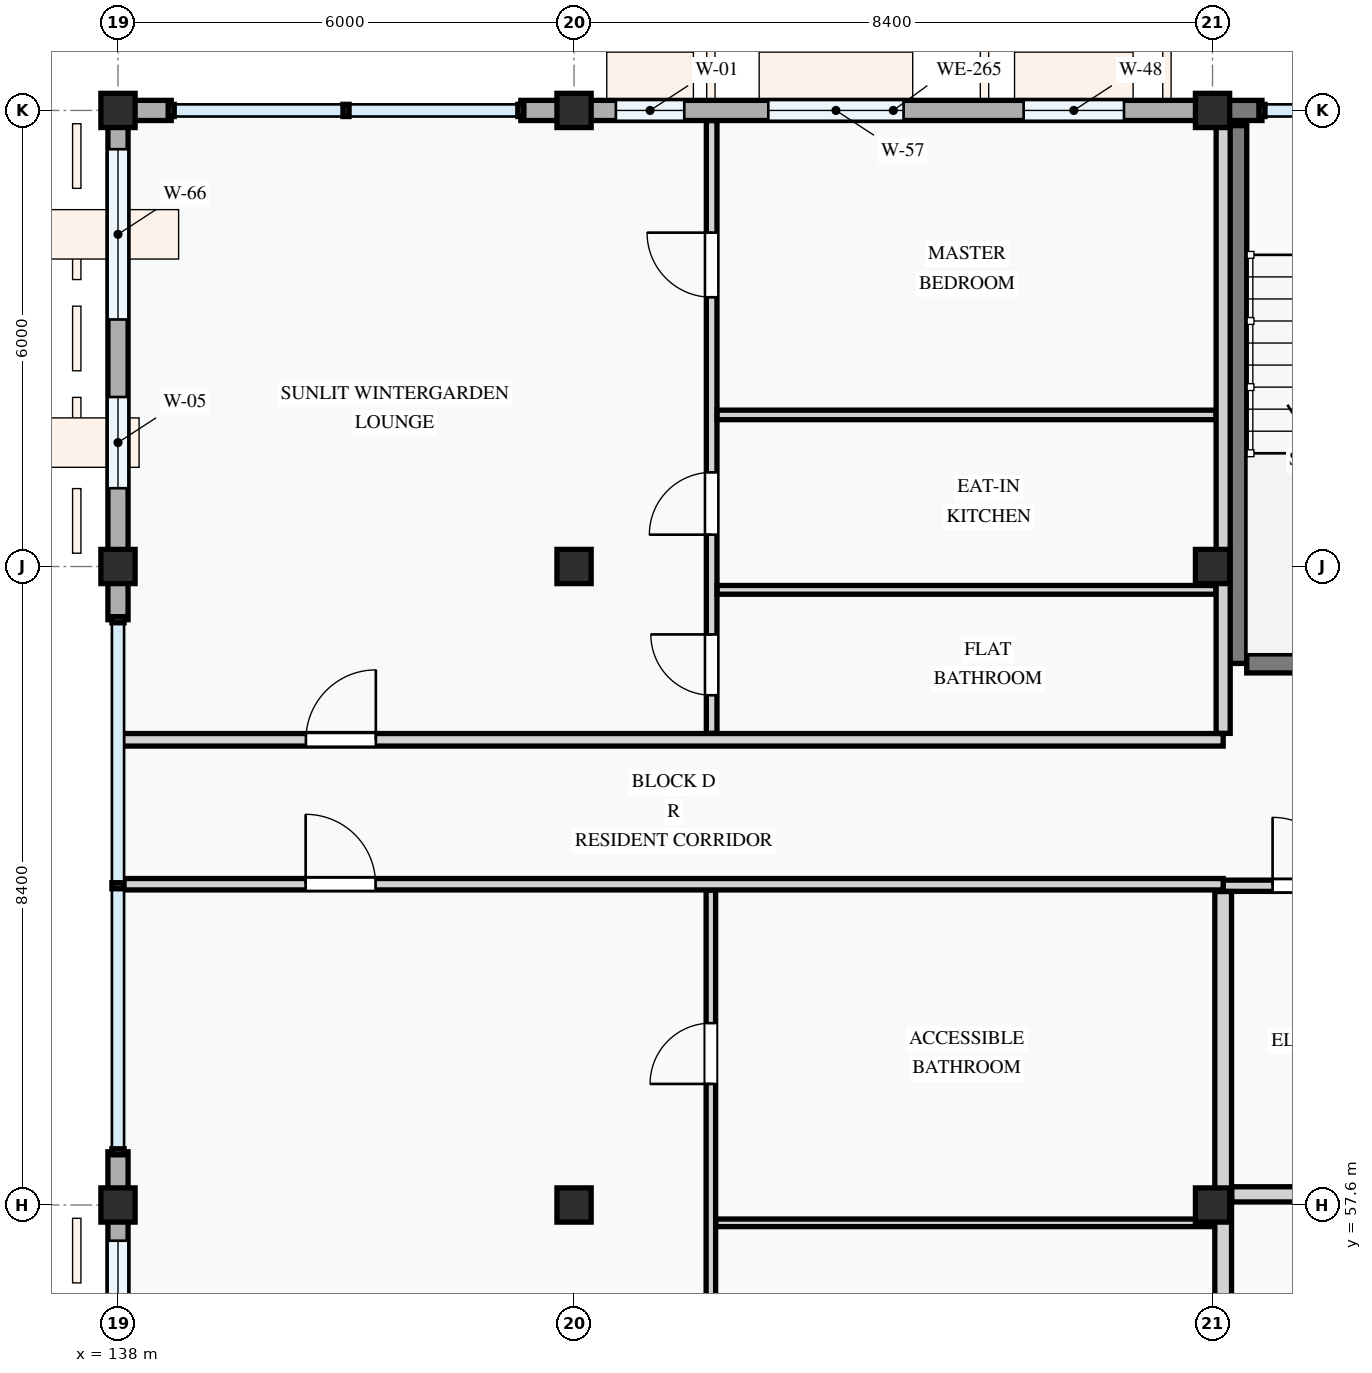
"""IFC4 building model, lengths in metres.
Left out: names, types, materials, properties, quantities, classifications, styles, units other than length and angle.
Written with IfcOpenShell. Run it as: python <this file> out.ifc"""

import sys

from ifc_helpers import new_model, si_unit, direction, frame, frame_2d, origin, origin_2d, place, context, subcontext, project, spatial, rectangle, extrude, element, fill, save


model = new_model("IFC4")
c1 = context("Model", 3, precision=1e-05, world=origin(), true_north=direction((0.0, 1.0)))
c2 = subcontext(c1, "Body", "Model", "MODEL_VIEW")
j1 = project(units=[si_unit("LENGTHUNIT", "METRE"), si_unit("PLANEANGLEUNIT", "RADIAN")], contexts=[c1])
p1 = place(None, origin())
s1 = spatial("IfcSite", under=j1, at=p1, CompositionType="ELEMENT")
p2 = place(p1, origin())
s2 = spatial("IfcBuilding", under=s1, at=p2, CompositionType="ELEMENT")
p3 = place(p2, frame((0.0, 0.0, 24.6)))
s3 = spatial("IfcBuildingStorey", under=s2, at=p3, CompositionType="ELEMENT", Elevation=24.6)
for number, where, z_axis, x_axis in (
    (1, (138.0, 57.6, 0.0), (0.0, 0.0, 1.0), (1.0, 0.0, 0.0)),
    (2, (138.0, 66.0, 0.0), (0.0, 0.0, 1.0), (1.0, 0.0, 0.0)),
    (3, (138.0, 72.0, 0.0), (0.0, 0.0, 1.0), (1.0, 0.0, 0.0)),
    (4, (144.0, 57.6, 0.0), (0.0, 0.0, 1.0), (1.0, 0.0, 0.0)),
    (5, (144.0, 66.0, 0.0), (0.0, 0.0, 1.0), (1.0, 0.0, 0.0)),
    (6, (144.0, 72.0, 0.0), (0.0, 0.0, 1.0), (1.0, 0.0, 0.0)),
    (7, (152.4, 57.6, 0.0), (0.0, 0.0, 1.0), (1.0, 0.0, 0.0)),
    (8, (152.4, 66.0, 0.0), (0.0, 0.0, 1.0), (1.0, 0.0, 0.0)),
    (9, (152.4, 72.0, 0.0), (0.0, 0.0, 1.0), (1.0, 0.0, 0.0)),
):
    element("IfcColumn", number, at=place(p3, frame(where, z_axis=z_axis, x_axis=x_axis)), inside=s3, PredefinedType="COLUMN", context=c2, shape_type="SweptSolid", body=[
        extrude(rectangle(XDim=0.45, YDim=0.45, at=origin_2d()), origin(), (0.0, 0.0, 1.0), 3.3),
    ])
p4 = place(p3, frame((152.4, 72.0, 0.0), z_axis=(0.0, 0.0, 1.0), x_axis=(-1.0, 0.0, 0.0)))
e10 = element("IfcWall", 10, at=p4, inside=s3, PredefinedType="STANDARD", context=c2, shape_type="SweptSolid", body=[
    extrude(rectangle(XDim=8.4, YDim=0.265, at=frame_2d((4.2, 0.0))), origin(), (0.0, 0.0, 1.0), 2.375),
])
p5 = place(p4, frame((1.165, 0.0, 0.78)))
e11 = element("IfcOpeningElement", 11, at=p5, cuts=e10, PredefinedType="OPENING", context=c2, shape_type="SweptSolid", body=[
    extrude(rectangle(XDim=1.32, YDim=1.35, at=frame_2d((0.66, 0.675))), frame((0.0, 0.143, 0.0), z_axis=(0.0, -1.0, 0.0), x_axis=(1.0, 0.0, 0.0)), (0.0, 0.0, 1.0), 0.285),
])
p6 = place(p4, frame((4.065, 0.0, 0.78)))
e12 = element("IfcOpeningElement", 12, at=p6, cuts=e10, PredefinedType="OPENING", context=c2, shape_type="SweptSolid", body=[
    extrude(rectangle(XDim=1.78, YDim=1.42, at=frame_2d((0.89, 0.71))), frame((0.0, 0.143, 0.0), z_axis=(0.0, -1.0, 0.0), x_axis=(1.0, 0.0, 0.0)), (0.0, 0.0, 1.0), 0.285),
])
p7 = place(p4, frame((6.95, 0.0, 0.78)))
e13 = element("IfcOpeningElement", 13, at=p7, cuts=e10, PredefinedType="OPENING", context=c2, shape_type="SweptSolid", body=[
    extrude(rectangle(XDim=0.9, YDim=1.2, at=frame_2d((0.45, 0.6))), frame((0.0, 0.143, 0.0), z_axis=(0.0, -1.0, 0.0), x_axis=(1.0, 0.0, 0.0)), (0.0, 0.0, 1.0), 0.285),
])
p8 = place(p3, frame((144.0, 72.0, 0.0), z_axis=(0.0, 0.0, 1.0), x_axis=(-1.0, 0.0, 0.0)))
e14 = element("IfcWall", 14, at=p8, inside=s3, PredefinedType="STANDARD", context=c2, shape_type="SweptSolid", body=[
    extrude(rectangle(XDim=0.7, YDim=0.265, at=frame_2d((0.35, 0.0))), origin(), (0.0, 0.0, 1.0), 2.475),
])
p9 = place(p3, frame((138.7, 72.0, 0.0), z_axis=(0.0, 0.0, 1.0), x_axis=(-1.0, 0.0, 0.0)))
e15 = element("IfcWall", 15, at=p9, inside=s3, PredefinedType="STANDARD", context=c2, shape_type="SweptSolid", body=[
    extrude(rectangle(XDim=0.565, YDim=0.265, at=frame_2d((0.283, 0.0))), origin(), (0.0, 0.0, 1.0), 2.475),
])
p10 = place(p3, frame((138.0, 72.0, 0.0), z_axis=(0.0, 0.0, 1.0), x_axis=(0.0, -1.0, 0.0)))
e16 = element("IfcWall", 16, at=p10, inside=s3, PredefinedType="STANDARD", context=c2, shape_type="SweptSolid", body=[
    extrude(rectangle(XDim=6.0, YDim=0.265, at=frame_2d((3.0, 0.0))), origin(), (0.0, 0.0, 1.0), 2.575),
])
p11 = place(p10, frame((0.51, 0.0, 0.78)))
e17 = element("IfcOpeningElement", 17, at=p11, cuts=e16, PredefinedType="OPENING", context=c2, shape_type="SweptSolid", body=[
    extrude(rectangle(XDim=2.24, YDim=1.52, at=frame_2d((1.12, 0.76))), frame((0.0, 0.143, 0.0), z_axis=(0.0, -1.0, 0.0), x_axis=(1.0, 0.0, 0.0)), (0.0, 0.0, 1.0), 0.285),
])
p12 = place(p10, frame((3.77, 0.0, 0.78)))
e18 = element("IfcOpeningElement", 18, at=p12, cuts=e16, PredefinedType="OPENING", context=c2, shape_type="SweptSolid", body=[
    extrude(rectangle(XDim=1.2, YDim=1.5, at=frame_2d((0.6, 0.75))), frame((0.0, 0.143, 0.0), z_axis=(0.0, -1.0, 0.0), x_axis=(1.0, 0.0, 0.0)), (0.0, 0.0, 1.0), 0.285),
])
for number, where, z_axis, x_axis in (
    (19, (138.0, 66.0, 0.0), (0.0, 0.0, 1.0), (0.0, -1.0, 0.0)),
    (20, (138.0, 58.3, 0.0), (0.0, 0.0, 1.0), (0.0, -1.0, 0.0)),
):
    element("IfcWall", number, at=place(p3, frame(where, z_axis=z_axis, x_axis=x_axis)), inside=s3, PredefinedType="STANDARD", context=c2, shape_type="SweptSolid", body=[
        extrude(rectangle(XDim=0.7, YDim=0.265, at=frame_2d((0.35, 0.0))), origin(), (0.0, 0.0, 1.0), 2.425),
    ])
p13 = place(p3, frame((138.0, 57.6, 0.0), z_axis=(0.0, 0.0, 1.0), x_axis=(0.0, -1.0, 0.0)))
e21 = element("IfcWall", 21, at=p13, inside=s3, PredefinedType="STANDARD", context=c2, shape_type="SweptSolid", body=[
    extrude(rectangle(XDim=6.0, YDim=0.265, at=frame_2d((3.0, 0.0))), origin(), (0.0, 0.0, 1.0), 2.575),
])
p14 = place(p13, frame((0.47, 0.0, 0.78)))
e22 = element("IfcOpeningElement", 22, at=p14, cuts=e21, PredefinedType="OPENING", context=c2, shape_type="SweptSolid", body=[
    extrude(rectangle(XDim=2.32, YDim=1.5, at=frame_2d((1.16, 0.75))), frame((0.0, 0.143, 0.0), z_axis=(0.0, -1.0, 0.0), x_axis=(1.0, 0.0, 0.0)), (0.0, 0.0, 1.0), 0.285),
])
p15 = place(p13, frame((3.695, 0.0, 0.78)))
e23 = element("IfcOpeningElement", 23, at=p15, cuts=e21, PredefinedType="OPENING", context=c2, shape_type="SweptSolid", body=[
    extrude(rectangle(XDim=1.35, YDim=1.55, at=frame_2d((0.675, 0.775))), frame((0.0, 0.143, 0.0), z_axis=(0.0, -1.0, 0.0), x_axis=(1.0, 0.0, 0.0)), (0.0, 0.0, 1.0), 0.285),
])
p16 = place(p3, frame((153.05, 72.0, 0.0), z_axis=(0.0, 0.0, 1.0), x_axis=(-1.0, 0.0, 0.0)))
e24 = element("IfcWall", 24, at=p16, inside=s3, PredefinedType="STANDARD", context=c2, shape_type="SweptSolid", body=[
    extrude(rectangle(XDim=0.65, YDim=0.265, at=frame_2d((0.325, 0.0))), origin(), (0.0, 0.0, 1.0), 3.04),
])
p17 = place(p3, frame((152.725, 71.8, 0.0), z_axis=(0.0, 0.0, 1.0), x_axis=(0.0, -1.0, 0.0)))
e25 = element("IfcWall", 25, at=p17, inside=s3, PredefinedType="SHEAR", context=c2, shape_type="SweptSolid", body=[
    extrude(rectangle(XDim=7.075, YDim=0.25, at=frame_2d((3.538, 0.0))), origin(), (0.0, 0.0, 1.0), 3.0),
])
p18 = place(p3, frame((152.85, 64.725, 0.0), z_axis=(0.0, 0.0, 1.0), x_axis=(1.0, 0.0, 0.0)))
e26 = element("IfcWall", 26, at=p18, inside=s3, PredefinedType="SHEAR", context=c2, shape_type="SweptSolid", body=[
    extrude(rectangle(XDim=13.5, YDim=0.25, at=frame_2d((6.75, 0.0))), origin(), (0.0, 0.0, 1.0), 3.0),
])
p19 = place(p18, frame((6.2, 0.0, 0.0)))
e27 = element("IfcOpeningElement", 27, at=p19, cuts=e26, PredefinedType="OPENING", context=c2, shape_type="SweptSolid", body=[
    extrude(rectangle(XDim=1.1, YDim=2.15, at=frame_2d((0.55, 1.075))), frame((0.0, 0.135, 0.0), z_axis=(0.0, -1.0, 0.0), x_axis=(1.0, 0.0, 0.0)), (0.0, 0.0, 1.0), 0.27),
])
p20 = place(p3, frame((152.54, 61.8, 0.0), z_axis=(0.0, 0.0, 1.0), x_axis=(1.0, 0.0, 0.0)))
e28 = element("IfcWall", 28, at=p20, inside=s3, PredefinedType="PARTITIONING", context=c2, shape_type="SweptSolid", body=[
    extrude(rectangle(XDim=7.435, YDim=0.148, at=frame_2d((3.718, 0.0))), origin(), (0.0, 0.0, 1.0), 3.0),
])
p21 = place(p20, frame((0.65, 0.0, 0.0)))
e29 = element("IfcOpeningElement", 29, at=p21, cuts=e28, PredefinedType="OPENING", context=c2, shape_type="SweptSolid", body=[
    extrude(rectangle(XDim=0.9, YDim=2.1, at=frame_2d((0.45, 1.05))), frame((0.0, 0.084, 0.0), z_axis=(0.0, -1.0, 0.0), x_axis=(1.0, 0.0, 0.0)), (0.0, 0.0, 1.0), 0.168),
])
p22 = place(p20, frame((4.2, 0.0, 0.0)))
e30 = element("IfcOpeningElement", 30, at=p22, cuts=e28, PredefinedType="OPENING", context=c2, shape_type="SweptSolid", body=[
    extrude(rectangle(XDim=0.95, YDim=2.1, at=frame_2d((0.475, 1.05))), frame((0.0, 0.084, 0.0), z_axis=(0.0, -1.0, 0.0), x_axis=(1.0, 0.0, 0.0)), (0.0, 0.0, 1.0), 0.168),
])
p23 = place(p3, frame((152.652, 57.74, 0.0), z_axis=(0.0, 0.0, 1.0), x_axis=(1.0, 0.0, 0.0)))
e31 = element("IfcWall", 31, at=p23, inside=s3, PredefinedType="PARTITIONING", context=c2, shape_type="SweptSolid", body=[
    extrude(rectangle(XDim=7.351, YDim=0.2, at=frame_2d((3.675, 0.0))), origin(), (0.0, 0.0, 1.0), 2.375),
])
p24 = place(p3, frame((145.8, 43.334, 0.0), z_axis=(0.0, 0.0, 1.0), x_axis=(0.0, 1.0, 0.0)))
e32 = element("IfcWall", 32, at=p24, inside=s3, PredefinedType="PARTITIONING", context=c2, shape_type="SweptSolid", body=[
    extrude(rectangle(XDim=18.408, YDim=0.125, at=frame_2d((9.204, 0.0))), origin(), (0.0, 0.0, 1.0), 3.0),
])
p25 = place(p24, frame((3.955, 0.0, 0.0)))
e33 = element("IfcOpeningElement", 33, at=p25, cuts=e32, PredefinedType="OPENING", context=c2, shape_type="SweptSolid", body=[
    extrude(rectangle(XDim=0.82, YDim=2.08, at=frame_2d((0.41, 1.04))), frame((0.0, 0.073, 0.0), z_axis=(0.0, -1.0, 0.0), x_axis=(1.0, 0.0, 0.0)), (0.0, 0.0, 1.0), 0.145),
])
p26 = place(p24, frame((11.008, 0.0, 0.0)))
e34 = element("IfcOpeningElement", 34, at=p26, cuts=e32, PredefinedType="OPENING", context=c2, shape_type="SweptSolid", body=[
    extrude(rectangle(XDim=0.85, YDim=2.1, at=frame_2d((0.425, 1.05))), frame((0.0, 0.073, 0.0), z_axis=(0.0, -1.0, 0.0), x_axis=(1.0, 0.0, 0.0)), (0.0, 0.0, 1.0), 0.145),
])
p27 = place(p24, frame((15.858, 0.0, 0.0)))
e35 = element("IfcOpeningElement", 35, at=p27, cuts=e32, PredefinedType="OPENING", context=c2, shape_type="SweptSolid", body=[
    extrude(rectangle(XDim=0.8, YDim=2.1, at=frame_2d((0.4, 1.05))), frame((0.0, 0.073, 0.0), z_axis=(0.0, -1.0, 0.0), x_axis=(1.0, 0.0, 0.0)), (0.0, 0.0, 1.0), 0.145),
])
p28 = place(p3, frame((145.865, 57.365, 0.0), z_axis=(0.0, 0.0, 1.0), x_axis=(1.0, 0.0, 0.0)))
e36 = element("IfcWall", 36, at=p28, inside=s3, PredefinedType="PARTITIONING", context=c2, shape_type="SweptSolid", body=[
    extrude(rectangle(XDim=6.563, YDim=0.1, at=frame_2d((3.282, 0.0))), origin(), (0.0, 0.0, 1.0), 2.375),
])
p29 = place(p3, frame((145.81, 63.804, 0.0), z_axis=(0.0, 0.0, 1.0), x_axis=(0.0, 1.0, 0.0)))
e37 = element("IfcWall", 37, at=p29, inside=s3, PredefinedType="PARTITIONING", context=c2, shape_type="SweptSolid", body=[
    extrude(rectangle(XDim=8.061, YDim=0.14, at=frame_2d((4.031, 0.0))), origin(), (0.0, 0.0, 1.0), 3.0),
])
p30 = place(p29, frame((0.502, 0.0, 0.0)))
e38 = element("IfcOpeningElement", 38, at=p30, cuts=e37, PredefinedType="OPENING", context=c2, shape_type="SweptSolid", body=[
    extrude(rectangle(XDim=0.8, YDim=2.1, at=frame_2d((0.4, 1.05))), frame((0.0, 0.08, 0.0), z_axis=(0.0, -1.0, 0.0), x_axis=(1.0, 0.0, 0.0)), (0.0, 0.0, 1.0), 0.16),
])
p31 = place(p29, frame((2.614, 0.0, 0.0)))
e39 = element("IfcOpeningElement", 39, at=p31, cuts=e37, PredefinedType="OPENING", context=c2, shape_type="SweptSolid", body=[
    extrude(rectangle(XDim=0.82, YDim=2.08, at=frame_2d((0.41, 1.04))), frame((0.0, 0.08, 0.0), z_axis=(0.0, -1.0, 0.0), x_axis=(1.0, 0.0, 0.0)), (0.0, 0.0, 1.0), 0.16),
])
p32 = place(p29, frame((5.738, 0.0, 0.0)))
e40 = element("IfcOpeningElement", 40, at=p32, cuts=e37, PredefinedType="OPENING", context=c2, shape_type="SweptSolid", body=[
    extrude(rectangle(XDim=0.85, YDim=2.1, at=frame_2d((0.425, 1.05))), frame((0.0, 0.08, 0.0), z_axis=(0.0, -1.0, 0.0), x_axis=(1.0, 0.0, 0.0)), (0.0, 0.0, 1.0), 0.16),
])
p33 = place(p3, frame((145.882, 67.994, 0.0), z_axis=(0.0, 0.0, 1.0), x_axis=(1.0, 0.0, 0.0)))
e41 = element("IfcWall", 41, at=p33, inside=s3, PredefinedType="PARTITIONING", context=c2, shape_type="SweptSolid", body=[
    extrude(rectangle(XDim=6.563, YDim=0.125, at=frame_2d((3.282, 0.0))), origin(), (0.0, 0.0, 1.0), 3.0),
])
p34 = place(p3, frame((145.882, 65.693, 0.0), z_axis=(0.0, 0.0, 1.0), x_axis=(1.0, 0.0, 0.0)))
e42 = element("IfcWall", 42, at=p34, inside=s3, PredefinedType="PARTITIONING", context=c2, shape_type="SweptSolid", body=[
    extrude(rectangle(XDim=6.563, YDim=0.115, at=frame_2d((3.282, 0.0))), origin(), (0.0, 0.0, 1.0), 2.375),
])
p35 = place(p3, frame((152.54, 43.26, 0.0), z_axis=(0.0, 0.0, 1.0), x_axis=(0.0, 1.0, 0.0)))
e43 = element("IfcWall", 43, at=p35, inside=s3, PredefinedType="PARTITIONING", context=c2, shape_type="SweptSolid", body=[
    extrude(rectangle(XDim=18.464, YDim=0.22, at=frame_2d((9.232, 0.0))), origin(), (0.0, 0.0, 1.0), 2.425),
])
p36 = place(p3, frame((152.54, 63.804, 0.0), z_axis=(0.0, 0.0, 1.0), x_axis=(0.0, 1.0, 0.0)))
e44 = element("IfcWall", 44, at=p36, inside=s3, PredefinedType="PARTITIONING", context=c2, shape_type="SweptSolid", body=[
    extrude(rectangle(XDim=8.061, YDim=0.185, at=frame_2d((4.031, 0.0))), origin(), (0.0, 0.0, 1.0), 2.425),
])
p37 = place(p3, frame((138.06, 61.82, 0.0), z_axis=(0.0, 0.0, 1.0), x_axis=(1.0, 0.0, 0.0)))
e45 = element("IfcWall", 45, at=p37, inside=s3, PredefinedType="PARTITIONING", context=c2, shape_type="SweptSolid", body=[
    extrude(rectangle(XDim=14.48, YDim=0.15, at=frame_2d((7.24, 0.0))), origin(), (0.0, 0.0, 1.0), 3.0),
])
p38 = place(p37, frame((2.409, 0.0, 0.0)))
e46 = element("IfcOpeningElement", 46, at=p38, cuts=e45, PredefinedType="OPENING", context=c2, shape_type="SweptSolid", body=[
    extrude(rectangle(XDim=0.92, YDim=2.1, at=frame_2d((0.46, 1.05))), frame((0.0, 0.085, 0.0), z_axis=(0.0, -1.0, 0.0), x_axis=(1.0, 0.0, 0.0)), (0.0, 0.0, 1.0), 0.17),
])
p39 = place(p3, frame((138.06, 63.72, 0.0), z_axis=(0.0, 0.0, 1.0), x_axis=(1.0, 0.0, 0.0)))
e47 = element("IfcWall", 47, at=p39, inside=s3, PredefinedType="PARTITIONING", context=c2, shape_type="SweptSolid", body=[
    extrude(rectangle(XDim=14.48, YDim=0.165, at=frame_2d((7.24, 0.0))), origin(), (0.0, 0.0, 1.0), 3.0),
])
p40 = place(p39, frame((2.412, 0.0, 0.0)))
e48 = element("IfcOpeningElement", 48, at=p40, cuts=e47, PredefinedType="OPENING", context=c2, shape_type="SweptSolid", body=[
    extrude(rectangle(XDim=0.92, YDim=2.1, at=frame_2d((0.46, 1.05))), frame((0.0, 0.093, 0.0), z_axis=(0.0, -1.0, 0.0), x_axis=(1.0, 0.0, 0.0)), (0.0, 0.0, 1.0), 0.185),
])
p41 = place(p5, origin())
e49 = element("IfcWindow", 49, at=p41, inside=s3, PartitioningType="SINGLE_PANEL", PredefinedType="WINDOW", context=c2, shape_type="SweptSolid", body=[
    extrude(rectangle(XDim=1.32, YDim=1.35, at=frame_2d((0.66, 0.675))), frame((0.0, 0.03, 0.0), z_axis=(0.0, -1.0, 0.0), x_axis=(1.0, 0.0, 0.0)), (0.0, 0.0, 1.0), 0.06),
])
fill(e11, e49)
p42 = place(p6, origin())
e50 = element("IfcWindow", 50, at=p42, inside=s3, PartitioningType="DOUBLE_PANEL_VERTICAL", PredefinedType="WINDOW", context=c2, shape_type="SweptSolid", body=[
    extrude(rectangle(XDim=1.78, YDim=1.42, at=frame_2d((0.89, 0.71))), frame((0.0, 0.03, 0.0), z_axis=(0.0, -1.0, 0.0), x_axis=(1.0, 0.0, 0.0)), (0.0, 0.0, 1.0), 0.06),
])
fill(e12, e50)
p43 = place(p7, origin())
e51 = element("IfcWindow", 51, at=p43, inside=s3, PartitioningType="SINGLE_PANEL", PredefinedType="WINDOW", context=c2, shape_type="SweptSolid", body=[
    extrude(rectangle(XDim=0.9, YDim=1.2, at=frame_2d((0.45, 0.6))), frame((0.0, 0.03, 0.0), z_axis=(0.0, -1.0, 0.0), x_axis=(1.0, 0.0, 0.0)), (0.0, 0.0, 1.0), 0.06),
])
fill(e13, e51)
p44 = place(p11, origin())
e52 = element("IfcWindow", 52, at=p44, inside=s3, PartitioningType="DOUBLE_PANEL_VERTICAL", PredefinedType="WINDOW", context=c2, shape_type="SweptSolid", body=[
    extrude(rectangle(XDim=2.24, YDim=1.52, at=frame_2d((1.12, 0.76))), frame((0.0, 0.03, 0.0), z_axis=(0.0, -1.0, 0.0), x_axis=(1.0, 0.0, 0.0)), (0.0, 0.0, 1.0), 0.06),
])
fill(e17, e52)
p45 = place(p12, origin())
e53 = element("IfcWindow", 53, at=p45, inside=s3, PartitioningType="SINGLE_PANEL", PredefinedType="WINDOW", context=c2, shape_type="SweptSolid", body=[
    extrude(rectangle(XDim=1.2, YDim=1.5, at=frame_2d((0.6, 0.75))), frame((0.0, 0.03, 0.0), z_axis=(0.0, -1.0, 0.0), x_axis=(1.0, 0.0, 0.0)), (0.0, 0.0, 1.0), 0.06),
])
fill(e18, e53)
p46 = place(p14, origin())
e54 = element("IfcWindow", 54, at=p46, inside=s3, PartitioningType="DOUBLE_PANEL_VERTICAL", PredefinedType="WINDOW", context=c2, shape_type="SweptSolid", body=[
    extrude(rectangle(XDim=2.32, YDim=1.5, at=frame_2d((1.16, 0.75))), frame((0.0, 0.03, 0.0), z_axis=(0.0, -1.0, 0.0), x_axis=(1.0, 0.0, 0.0)), (0.0, 0.0, 1.0), 0.06),
])
fill(e22, e54)
p47 = place(p21, origin())
e55 = element("IfcDoor", 55, at=p47, inside=s3, OperationType="SINGLE_SWING_LEFT", PredefinedType="DOOR", context=c2, shape_type="SweptSolid", body=[
    extrude(rectangle(XDim=0.9, YDim=2.1, at=frame_2d((0.45, 1.05))), frame((0.0, 0.025, 0.0), z_axis=(0.0, -1.0, 0.0), x_axis=(1.0, 0.0, 0.0)), (0.0, 0.0, 1.0), 0.05),
])
fill(e29, e55)
p48 = place(p27, origin())
e56 = element("IfcDoor", 56, at=p48, inside=s3, OperationType="SINGLE_SWING_LEFT", PredefinedType="DOOR", context=c2, shape_type="SweptSolid", body=[
    extrude(rectangle(XDim=0.8, YDim=2.1, at=frame_2d((0.4, 1.05))), frame((0.0, 0.025, 0.0), z_axis=(0.0, -1.0, 0.0), x_axis=(1.0, 0.0, 0.0)), (0.0, 0.0, 1.0), 0.05),
])
fill(e35, e56)
p49 = place(p30, origin())
e57 = element("IfcDoor", 57, at=p49, inside=s3, OperationType="SINGLE_SWING_RIGHT", PredefinedType="DOOR", context=c2, shape_type="SweptSolid", body=[
    extrude(rectangle(XDim=0.8, YDim=2.1, at=frame_2d((0.4, 1.05))), frame((0.0, 0.025, 0.0), z_axis=(0.0, -1.0, 0.0), x_axis=(1.0, 0.0, 0.0)), (0.0, 0.0, 1.0), 0.05),
])
fill(e38, e57)
p50 = place(p31, origin())
e58 = element("IfcDoor", 58, at=p50, inside=s3, OperationType="SINGLE_SWING_LEFT", PredefinedType="DOOR", context=c2, shape_type="SweptSolid", body=[
    extrude(rectangle(XDim=0.82, YDim=2.08, at=frame_2d((0.41, 1.04))), frame((0.0, 0.025, 0.0), z_axis=(0.0, -1.0, 0.0), x_axis=(1.0, 0.0, 0.0)), (0.0, 0.0, 1.0), 0.05),
])
fill(e39, e58)
p51 = place(p32, origin())
e59 = element("IfcDoor", 59, at=p51, inside=s3, OperationType="SINGLE_SWING_RIGHT", PredefinedType="DOOR", context=c2, shape_type="SweptSolid", body=[
    extrude(rectangle(XDim=0.85, YDim=2.1, at=frame_2d((0.425, 1.05))), frame((0.0, 0.025, 0.0), z_axis=(0.0, -1.0, 0.0), x_axis=(1.0, 0.0, 0.0)), (0.0, 0.0, 1.0), 0.05),
])
fill(e40, e59)
p52 = place(p38, origin())
e60 = element("IfcDoor", 60, at=p52, inside=s3, OperationType="SINGLE_SWING_LEFT", PredefinedType="DOOR", context=c2, shape_type="SweptSolid", body=[
    extrude(rectangle(XDim=0.92, YDim=2.1, at=frame_2d((0.46, 1.05))), frame((0.0, 0.025, 0.0), z_axis=(0.0, -1.0, 0.0), x_axis=(1.0, 0.0, 0.0)), (0.0, 0.0, 1.0), 0.05),
])
fill(e46, e60)
p53 = place(p40, origin())
e61 = element("IfcDoor", 61, at=p53, inside=s3, OperationType="SINGLE_SWING_RIGHT", PredefinedType="DOOR", context=c2, shape_type="SweptSolid", body=[
    extrude(rectangle(XDim=0.92, YDim=2.1, at=frame_2d((0.46, 1.05))), frame((0.0, 0.025, 0.0), z_axis=(0.0, -1.0, 0.0), x_axis=(1.0, 0.0, 0.0)), (0.0, 0.0, 1.0), 0.05),
])
fill(e48, e61)
save(model, sys.argv[1])
